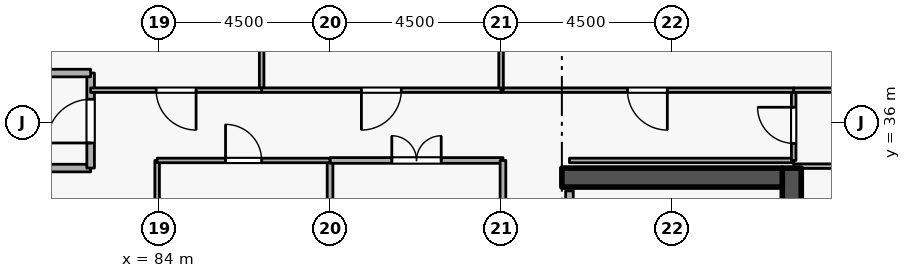
"""IFC4 building model, lengths in metres.
Left out: names, types, materials, properties, quantities, classifications, styles, units other than length and angle.
Written with IfcOpenShell. Run it as: python <this file> out.ifc"""

import sys

from ifc_helpers import new_model, si_unit, direction, frame, frame_2d, origin, place, context, subcontext, project, spatial, rectangle, extrude, element, fill, save


model = new_model("IFC4")
c1 = context("Model", 3, precision=1e-05, world=origin(), true_north=direction((0.0, 1.0)))
c2 = subcontext(c1, "Body", "Model", "MODEL_VIEW")
j1 = project(units=[si_unit("LENGTHUNIT", "METRE"), si_unit("PLANEANGLEUNIT", "RADIAN")], contexts=[c1])
p1 = place(None, origin())
s1 = spatial("IfcSite", under=j1, at=p1, CompositionType="ELEMENT")
p2 = place(p1, origin())
s2 = spatial("IfcBuilding", under=s1, at=p2, CompositionType="ELEMENT")
p3 = place(p2, frame((0.0, 0.0, 265.5)))
s3 = spatial("IfcBuildingStorey", under=s2, at=p3, CompositionType="ELEMENT", Elevation=265.5)
p4 = place(p3, frame((100.65, 19.2, 0.0), z_axis=(0.0, 0.0, 1.0), x_axis=(0.0, 1.0, 0.0)))
e1 = element("IfcWall", 1, at=p4, inside=s3, PredefinedType="SHEAR", context=c2, shape_type="SweptSolid", body=[
    extrude(rectangle(XDim=15.6, YDim=0.5, at=frame_2d((7.8, 0.0))), origin(), (0.0, 0.0, 1.0), 3.6),
])
p5 = place(p3, frame((94.6, 34.55, 0.0), z_axis=(0.0, 0.0, 1.0), x_axis=(1.0, 0.0, 0.0)))
e2 = element("IfcWall", 2, at=p5, inside=s3, PredefinedType="SHEAR", context=c2, shape_type="SweptSolid", body=[
    extrude(rectangle(XDim=5.8, YDim=0.5, at=frame_2d((2.9, 0.0))), origin(), (0.0, 0.0, 1.0), 3.6),
])
p6 = place(p3, frame((79.9, 34.8, 0.0), z_axis=(0.0, 0.0, 1.0), x_axis=(1.0, 0.0, 0.0)))
e3 = element("IfcWall", 3, at=p6, inside=s3, PredefinedType="STANDARD", context=c2, shape_type="SweptSolid", body=[
    extrude(rectangle(XDim=2.3, YDim=0.2, at=frame_2d((1.15, 0.0))), origin(), (0.0, 0.0, 1.0), 2.545),
])
p7 = place(p3, frame((82.2, 34.8, 0.0), z_axis=(0.0, 0.0, 1.0), x_axis=(0.0, 1.0, 0.0)))
e4 = element("IfcWall", 4, at=p7, inside=s3, PredefinedType="STANDARD", context=c2, shape_type="SweptSolid", body=[
    extrude(rectangle(XDim=2.5, YDim=0.2, at=frame_2d((1.25, 0.0))), origin(), (0.0, 0.0, 1.0), 3.34),
])
p8 = place(p7, frame((0.66, 0.0, 0.0)))
e5 = element("IfcOpeningElement", 5, at=p8, cuts=e4, PredefinedType="OPENING", context=c2, shape_type="SweptSolid", body=[
    extrude(rectangle(XDim=1.15, YDim=2.1, at=frame_2d((0.575, 1.05))), frame((0.0, 0.11, 0.0), z_axis=(0.0, -1.0, 0.0), x_axis=(1.0, 0.0, 0.0)), (0.0, 0.0, 1.0), 0.22),
])
p9 = place(p3, frame((82.2, 37.3, 0.0), z_axis=(0.0, 0.0, 1.0), x_axis=(-1.0, 0.0, 0.0)))
e6 = element("IfcWall", 6, at=p9, inside=s3, PredefinedType="STANDARD", context=c2, shape_type="SweptSolid", body=[
    extrude(rectangle(XDim=5.7, YDim=0.2, at=frame_2d((2.85, 0.0))), origin(), (0.0, 0.0, 1.0), 3.34),
])
p10 = place(p3, frame((94.8, 31.95, 0.0), z_axis=(0.0, 0.0, 1.0), x_axis=(0.0, 1.0, 0.0)))
e7 = element("IfcWall", 7, at=p10, inside=s3, PredefinedType="STANDARD", context=c2, shape_type="SweptSolid", body=[
    extrude(rectangle(XDim=2.25, YDim=0.2, at=frame_2d((1.125, 0.0))), origin(), (0.0, 0.0, 1.0), 3.34),
])
p11 = place(p10, frame((0.55, 0.0, 0.0)))
e8 = element("IfcOpeningElement", 8, at=p11, cuts=e7, PredefinedType="OPENING", context=c2, shape_type="SweptSolid", body=[
    extrude(rectangle(XDim=1.15, YDim=2.1, at=frame_2d((0.575, 1.05))), frame((0.0, 0.11, 0.0), z_axis=(0.0, -1.0, 0.0), x_axis=(1.0, 0.0, 0.0)), (0.0, 0.0, 1.0), 0.22),
])
p12 = place(p3, frame((94.8, 35.0, 0.0), z_axis=(0.0, 0.0, 1.0), x_axis=(1.0, 0.0, 0.0)))
e9 = element("IfcWall", 9, at=p12, inside=s3, PredefinedType="PARTITIONING", context=c2, shape_type="SweptSolid", body=[
    extrude(rectangle(XDim=5.9, YDim=0.12, at=frame_2d((2.95, 0.0))), origin(), (0.0, 0.0, 1.0), 3.34),
])
p13 = place(p3, frame((100.7, 35.0, 0.0), z_axis=(0.0, 0.0, 1.0), x_axis=(0.0, 1.0, 0.0)))
e10 = element("IfcWall", 10, at=p13, inside=s3, PredefinedType="PARTITIONING", context=c2, shape_type="SweptSolid", body=[
    extrude(rectangle(XDim=1.85, YDim=0.12, at=frame_2d((0.925, 0.0))), origin(), (0.0, 0.0, 1.0), 3.34),
])
p14 = place(p13, frame((0.45, 0.0, 0.0)))
e11 = element("IfcOpeningElement", 11, at=p14, cuts=e10, PredefinedType="OPENING", context=c2, shape_type="SweptSolid", body=[
    extrude(rectangle(XDim=0.95, YDim=2.1, at=frame_2d((0.475, 1.05))), frame((0.0, 0.07, 0.0), z_axis=(0.0, -1.0, 0.0), x_axis=(1.0, 0.0, 0.0)), (0.0, 0.0, 1.0), 0.14),
])
for number, where, z_axis, x_axis in (
    (12, (100.7, 36.85, 0.0), (0.0, 0.0, 1.0), (1.0, 0.0, 0.0)),
    (13, (112.22, 34.85, 0.0), (0.0, 0.0, 1.0), (-1.0, 0.0, 0.0)),
):
    element("IfcWall", number, at=place(p3, frame(where, z_axis=z_axis, x_axis=x_axis)), inside=s3, PredefinedType="PARTITIONING", context=c2, shape_type="SweptSolid", body=[
        extrude(rectangle(XDim=11.52, YDim=0.12, at=frame_2d((5.76, 0.0))), origin(), (0.0, 0.0, 1.0), 3.34),
    ])
p15 = place(p3, frame((100.7, 36.85, 0.0), z_axis=(0.0, 0.0, 1.0), x_axis=(-1.0, 0.0, 0.0)))
e14 = element("IfcWall", 14, at=p15, inside=s3, PredefinedType="PARTITIONING", context=c2, shape_type="SweptSolid", body=[
    extrude(rectangle(XDim=7.7, YDim=0.12, at=frame_2d((3.85, 0.0))), origin(), (0.0, 0.0, 1.0), 3.34),
])
p16 = place(p15, frame((3.325, 0.0, 0.0)))
e15 = element("IfcOpeningElement", 15, at=p16, cuts=e14, PredefinedType="OPENING", context=c2, shape_type="SweptSolid", body=[
    extrude(rectangle(XDim=1.05, YDim=2.1, at=frame_2d((0.525, 1.05))), frame((0.0, 0.07, 0.0), z_axis=(0.0, -1.0, 0.0), x_axis=(1.0, 0.0, 0.0)), (0.0, 0.0, 1.0), 0.14),
])
for number, where, z_axis, x_axis in (
    (16, (93.0, 36.85, 0.0), (0.0, 0.0, 1.0), (0.0, 1.0, 0.0)),
    (17, (86.7, 36.85, 0.0), (0.0, 0.0, 1.0), (0.0, 1.0, 0.0)),
):
    element("IfcWall", number, at=place(p3, frame(where, z_axis=z_axis, x_axis=x_axis)), inside=s3, PredefinedType="PARTITIONING", context=c2, shape_type="SweptSolid", body=[
        extrude(rectangle(XDim=13.87, YDim=0.12, at=frame_2d((6.935, 0.0))), origin(), (0.0, 0.0, 1.0), 3.34),
    ])
p17 = place(p3, frame((93.0, 36.85, 0.0), z_axis=(0.0, 0.0, 1.0), x_axis=(-1.0, 0.0, 0.0)))
e18 = element("IfcWall", 18, at=p17, inside=s3, PredefinedType="PARTITIONING", context=c2, shape_type="SweptSolid", body=[
    extrude(rectangle(XDim=6.3, YDim=0.12, at=frame_2d((3.15, 0.0))), origin(), (0.0, 0.0, 1.0), 3.34),
])
p18 = place(p17, frame((2.625, 0.0, 0.0)))
e19 = element("IfcOpeningElement", 19, at=p18, cuts=e18, PredefinedType="OPENING", context=c2, shape_type="SweptSolid", body=[
    extrude(rectangle(XDim=1.05, YDim=2.1, at=frame_2d((0.525, 1.05))), frame((0.0, 0.07, 0.0), z_axis=(0.0, -1.0, 0.0), x_axis=(1.0, 0.0, 0.0)), (0.0, 0.0, 1.0), 0.14),
])
p19 = place(p3, frame((86.7, 36.85, 0.0), z_axis=(0.0, 0.0, 1.0), x_axis=(-1.0, 0.0, 0.0)))
e20 = element("IfcWall", 20, at=p19, inside=s3, PredefinedType="PARTITIONING", context=c2, shape_type="SweptSolid", body=[
    extrude(rectangle(XDim=4.5, YDim=0.12, at=frame_2d((2.25, 0.0))), origin(), (0.0, 0.0, 1.0), 3.34),
])
p20 = place(p19, frame((1.725, 0.0, 0.0)))
e21 = element("IfcOpeningElement", 21, at=p20, cuts=e20, PredefinedType="OPENING", context=c2, shape_type="SweptSolid", body=[
    extrude(rectangle(XDim=1.05, YDim=2.1, at=frame_2d((0.525, 1.05))), frame((0.0, 0.07, 0.0), z_axis=(0.0, -1.0, 0.0), x_axis=(1.0, 0.0, 0.0)), (0.0, 0.0, 1.0), 0.14),
])
p21 = place(p3, frame((88.5, 32.2, 0.0), z_axis=(0.0, 0.0, 1.0), x_axis=(0.0, 1.0, 0.0)))
e22 = element("IfcWall", 22, at=p21, inside=s3, PredefinedType="PARTITIONING", context=c2, shape_type="SweptSolid", body=[
    extrude(rectangle(XDim=2.8, YDim=0.15, at=frame_2d((1.4, 0.0))), origin(), (0.0, 0.0, 1.0), 3.34),
])
p22 = place(p3, frame((88.5, 35.0, 0.0), z_axis=(0.0, 0.0, 1.0), x_axis=(1.0, 0.0, 0.0)))
e23 = element("IfcWall", 23, at=p22, inside=s3, PredefinedType="PARTITIONING", context=c2, shape_type="SweptSolid", body=[
    extrude(rectangle(XDim=4.55, YDim=0.15, at=frame_2d((2.275, 0.0))), origin(), (0.0, 0.0, 1.0), 3.34),
])
p23 = place(p22, frame((1.625, 0.0, 0.0)))
e24 = element("IfcOpeningElement", 24, at=p23, cuts=e23, PredefinedType="OPENING", context=c2, shape_type="SweptSolid", body=[
    extrude(rectangle(XDim=1.3, YDim=2.12, at=frame_2d((0.65, 1.06))), frame((0.0, 0.085, 0.0), z_axis=(0.0, -1.0, 0.0), x_axis=(1.0, 0.0, 0.0)), (0.0, 0.0, 1.0), 0.17),
])
p24 = place(p3, frame((93.05, 35.0, 0.0), z_axis=(0.0, 0.0, 1.0), x_axis=(0.0, -1.0, 0.0)))
e25 = element("IfcWall", 25, at=p24, inside=s3, PredefinedType="PARTITIONING", context=c2, shape_type="SweptSolid", body=[
    extrude(rectangle(XDim=2.8, YDim=0.15, at=frame_2d((1.4, 0.0))), origin(), (0.0, 0.0, 1.0), 3.34),
])
p25 = place(p3, frame((83.95, 32.2, 0.0), z_axis=(0.0, 0.0, 1.0), x_axis=(0.0, 1.0, 0.0)))
e26 = element("IfcWall", 26, at=p25, inside=s3, PredefinedType="PARTITIONING", context=c2, shape_type="SweptSolid", body=[
    extrude(rectangle(XDim=2.8, YDim=0.12, at=frame_2d((1.4, 0.0))), origin(), (0.0, 0.0, 1.0), 3.34),
])
p26 = place(p3, frame((83.95, 35.0, 0.0), z_axis=(0.0, 0.0, 1.0), x_axis=(1.0, 0.0, 0.0)))
e27 = element("IfcWall", 27, at=p26, inside=s3, PredefinedType="PARTITIONING", context=c2, shape_type="SweptSolid", body=[
    extrude(rectangle(XDim=4.55, YDim=0.12, at=frame_2d((2.275, 0.0))), origin(), (0.0, 0.0, 1.0), 3.34),
])
p27 = place(p26, frame((1.8, 0.0, 0.0)))
e28 = element("IfcOpeningElement", 28, at=p27, cuts=e27, PredefinedType="OPENING", context=c2, shape_type="SweptSolid", body=[
    extrude(rectangle(XDim=0.95, YDim=2.1, at=frame_2d((0.475, 1.05))), frame((0.0, 0.07, 0.0), z_axis=(0.0, -1.0, 0.0), x_axis=(1.0, 0.0, 0.0)), (0.0, 0.0, 1.0), 0.14),
])
p28 = place(p8, origin())
e29 = element("IfcDoor", 29, at=p28, inside=s3, OperationType="SINGLE_SWING_LEFT", PredefinedType="DOOR", context=c2, shape_type="SweptSolid", body=[
    extrude(rectangle(XDim=1.15, YDim=2.1, at=frame_2d((0.575, 1.05))), frame((0.0, 0.025, 0.0), z_axis=(0.0, -1.0, 0.0), x_axis=(1.0, 0.0, 0.0)), (0.0, 0.0, 1.0), 0.05),
])
fill(e5, e29)
p29 = place(p14, origin())
e30 = element("IfcDoor", 30, at=p29, inside=s3, OperationType="SINGLE_SWING_RIGHT", PredefinedType="DOOR", context=c2, shape_type="SweptSolid", body=[
    extrude(rectangle(XDim=0.95, YDim=2.1, at=frame_2d((0.475, 1.05))), frame((0.0, 0.025, 0.0), z_axis=(0.0, -1.0, 0.0), x_axis=(1.0, 0.0, 0.0)), (0.0, 0.0, 1.0), 0.05),
])
fill(e11, e30)
p30 = place(p16, origin())
e31 = element("IfcDoor", 31, at=p30, inside=s3, OperationType="SINGLE_SWING_LEFT", PredefinedType="DOOR", context=c2, shape_type="SweptSolid", body=[
    extrude(rectangle(XDim=1.05, YDim=2.1, at=frame_2d((0.525, 1.05))), frame((0.0, 0.025, 0.0), z_axis=(0.0, -1.0, 0.0), x_axis=(1.0, 0.0, 0.0)), (0.0, 0.0, 1.0), 0.05),
])
fill(e15, e31)
p31 = place(p18, origin())
e32 = element("IfcDoor", 32, at=p31, inside=s3, OperationType="SINGLE_SWING_RIGHT", PredefinedType="DOOR", context=c2, shape_type="SweptSolid", body=[
    extrude(rectangle(XDim=1.05, YDim=2.1, at=frame_2d((0.525, 1.05))), frame((0.0, 0.025, 0.0), z_axis=(0.0, -1.0, 0.0), x_axis=(1.0, 0.0, 0.0)), (0.0, 0.0, 1.0), 0.05),
])
fill(e19, e32)
p32 = place(p20, origin())
e33 = element("IfcDoor", 33, at=p32, inside=s3, OperationType="SINGLE_SWING_LEFT", PredefinedType="DOOR", context=c2, shape_type="SweptSolid", body=[
    extrude(rectangle(XDim=1.05, YDim=2.1, at=frame_2d((0.525, 1.05))), frame((0.0, 0.025, 0.0), z_axis=(0.0, -1.0, 0.0), x_axis=(1.0, 0.0, 0.0)), (0.0, 0.0, 1.0), 0.05),
])
fill(e21, e33)
p33 = place(p23, origin())
e34 = element("IfcDoor", 34, at=p33, inside=s3, OperationType="DOUBLE_DOOR_SINGLE_SWING", PredefinedType="DOOR", context=c2, shape_type="SweptSolid", body=[
    extrude(rectangle(XDim=1.3, YDim=2.12, at=frame_2d((0.65, 1.06))), frame((0.0, 0.025, 0.0), z_axis=(0.0, -1.0, 0.0), x_axis=(1.0, 0.0, 0.0)), (0.0, 0.0, 1.0), 0.05),
])
fill(e24, e34)
p34 = place(p27, origin())
e35 = element("IfcDoor", 35, at=p34, inside=s3, OperationType="SINGLE_SWING_LEFT", PredefinedType="DOOR", context=c2, shape_type="SweptSolid", body=[
    extrude(rectangle(XDim=0.95, YDim=2.1, at=frame_2d((0.475, 1.05))), frame((0.0, 0.025, 0.0), z_axis=(0.0, -1.0, 0.0), x_axis=(1.0, 0.0, 0.0)), (0.0, 0.0, 1.0), 0.05),
])
fill(e28, e35)
save(model, sys.argv[1])
